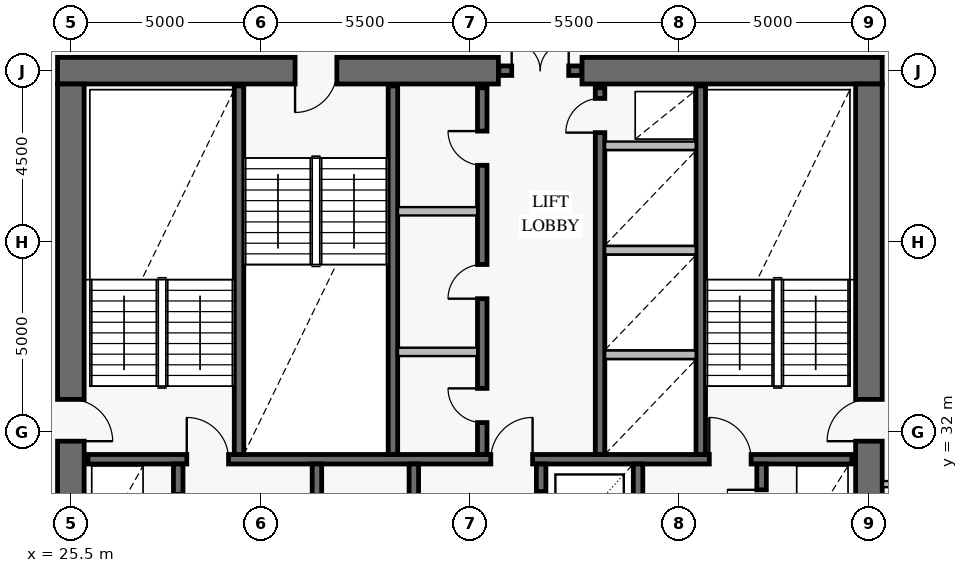
"""IFC4 building model, lengths in metres.
Left out: names, types, materials, properties, quantities, classifications, styles, units other than length and angle.
Written with IfcOpenShell. Run it as: python <this file> out.ifc"""

import sys

from ifc_helpers import new_model, si_unit, direction, frame, frame_2d, origin, place, context, subcontext, project, spatial, rectangle, extrude, element, fill, save


model = new_model("IFC4")
c1 = context("Model", 3, precision=1e-05, world=origin(), true_north=direction((0.0, 1.0)))
c2 = subcontext(c1, "Body", "Model", "MODEL_VIEW")
j1 = project(units=[si_unit("LENGTHUNIT", "METRE"), si_unit("PLANEANGLEUNIT", "RADIAN")], contexts=[c1])
p1 = place(None, origin())
s1 = spatial("IfcSite", under=j1, at=p1, CompositionType="ELEMENT")
p2 = place(p1, origin())
s2 = spatial("IfcBuilding", under=s1, at=p2, CompositionType="ELEMENT")
p3 = place(p2, frame((0.0, 0.0, 196.0)))
s3 = spatial("IfcBuildingStorey", under=s2, at=p3, CompositionType="ELEMENT", Elevation=196.0)
p4 = place(p3, frame((46.85, 41.5, 0.0), z_axis=(0.0, 0.0, 1.0), x_axis=(-1.0, 0.0, 0.0)))
e1 = element("IfcWall", 1, at=p4, inside=s3, PredefinedType="SHEAR", context=c2, shape_type="SweptSolid", body=[
    extrude(rectangle(XDim=7.9, YDim=0.7, at=frame_2d((3.95, 0.0))), origin(), (0.0, 0.0, 1.0), 3.8),
])
p5 = place(p3, frame((36.75, 41.5, 0.0), z_axis=(0.0, 0.0, 1.0), x_axis=(-1.0, 0.0, 0.0)))
e2 = element("IfcWall", 2, at=p5, inside=s3, PredefinedType="SHEAR", context=c2, shape_type="SweptSolid", body=[
    extrude(rectangle(XDim=11.6, YDim=0.7, at=frame_2d((5.8, 0.0))), origin(), (0.0, 0.0, 1.0), 3.8),
])
p6 = place(p5, frame((4.25, 0.0, 0.0)))
e3 = element("IfcOpeningElement", 3, at=p6, cuts=e2, PredefinedType="OPENING", context=c2, shape_type="SweptSolid", body=[
    extrude(rectangle(XDim=1.1, YDim=2.15, at=frame_2d((0.55, 1.075))), frame((0.0, 0.362, 0.0), z_axis=(0.0, -1.0, 0.0), x_axis=(1.0, 0.0, 0.0)), (0.0, 0.0, 1.0), 0.724),
])
p7 = place(p3, frame((25.5, 22.85, 0.0), z_axis=(0.0, 0.0, 1.0), x_axis=(0.0, 1.0, 0.0)))
e4 = element("IfcWall", 4, at=p7, inside=s3, PredefinedType="SHEAR", context=c2, shape_type="SweptSolid", body=[
    extrude(rectangle(XDim=18.3, YDim=0.7, at=frame_2d((9.15, 0.0))), origin(), (0.0, 0.0, 1.0), 3.8),
])
p8 = place(p7, frame((8.9, 0.0, 0.0)))
e5 = element("IfcOpeningElement", 5, at=p8, cuts=e4, PredefinedType="OPENING", context=c2, shape_type="SweptSolid", body=[
    extrude(rectangle(XDim=1.1, YDim=2.15, at=frame_2d((0.55, 1.075))), frame((0.0, 0.362, 0.0), z_axis=(0.0, -1.0, 0.0), x_axis=(1.0, 0.0, 0.0)), (0.0, 0.0, 1.0), 0.724),
])
p9 = place(p3, frame((46.5, 22.85, 0.0), z_axis=(0.0, 0.0, 1.0), x_axis=(0.0, 1.0, 0.0)))
e6 = element("IfcWall", 6, at=p9, inside=s3, PredefinedType="SHEAR", context=c2, shape_type="SweptSolid", body=[
    extrude(rectangle(XDim=18.3, YDim=0.7, at=frame_2d((9.15, 0.0))), origin(), (0.0, 0.0, 1.0), 3.8),
])
p10 = place(p9, frame((8.9, 0.0, 0.0)))
e7 = element("IfcOpeningElement", 7, at=p10, cuts=e6, PredefinedType="OPENING", context=c2, shape_type="SweptSolid", body=[
    extrude(rectangle(XDim=1.1, YDim=2.15, at=frame_2d((0.55, 1.075))), frame((0.0, 0.362, 0.0), z_axis=(0.0, -1.0, 0.0), x_axis=(1.0, 0.0, 0.0)), (0.0, 0.0, 1.0), 0.724),
])
p11 = place(p3, frame((36.76, 41.5, 0.0), z_axis=(0.0, 0.0, 1.0), x_axis=(1.0, 0.0, 0.0)))
e8 = element("IfcWall", 8, at=p11, inside=s3, PredefinedType="SOLIDWALL", context=c2, shape_type="SweptSolid", body=[
    extrude(rectangle(XDim=2.18, YDim=0.25, at=frame_2d((1.09, 0.0))), origin(), (0.0, 0.0, 1.0), 3.8),
])
p12 = place(p11, frame((0.34, 0.0, 0.0)))
e9 = element("IfcOpeningElement", 9, at=p12, cuts=e8, PredefinedType="OPENING", context=c2, shape_type="SweptSolid", body=[
    extrude(rectangle(XDim=1.5, YDim=2.15, at=frame_2d((0.75, 1.075))), frame((0.0, 0.137, 0.0), z_axis=(0.0, -1.0, 0.0), x_axis=(1.0, 0.0, 0.0)), (0.0, 0.0, 1.0), 0.274),
])
p13 = place(p3, frame((25.95, 31.275, 0.0), z_axis=(0.0, 0.0, 1.0), x_axis=(1.0, 0.0, 0.0)))
e10 = element("IfcWall", 10, at=p13, inside=s3, PredefinedType="SOLIDWALL", context=c2, shape_type="SweptSolid", body=[
    extrude(rectangle(XDim=20.1, YDim=0.25, at=frame_2d((10.05, 0.0))), origin(), (0.0, 0.0, 1.0), 3.8),
])
p14 = place(p13, frame((2.6, 0.0, 0.0)))
e11 = element("IfcOpeningElement", 11, at=p14, cuts=e10, PredefinedType="OPENING", context=c2, shape_type="SweptSolid", body=[
    extrude(rectangle(XDim=1.1, YDim=2.15, at=frame_2d((0.55, 1.075))), frame((0.0, 0.137, 0.0), z_axis=(0.0, -1.0, 0.0), x_axis=(1.0, 0.0, 0.0)), (0.0, 0.0, 1.0), 0.274),
])
p15 = place(p13, frame((10.6, 0.0, 0.0)))
e12 = element("IfcOpeningElement", 12, at=p15, cuts=e10, PredefinedType="OPENING", context=c2, shape_type="SweptSolid", body=[
    extrude(rectangle(XDim=1.1, YDim=2.15, at=frame_2d((0.55, 1.075))), frame((0.0, 0.137, 0.0), z_axis=(0.0, -1.0, 0.0), x_axis=(1.0, 0.0, 0.0)), (0.0, 0.0, 1.0), 0.274),
])
p16 = place(p13, frame((16.35, 0.0, 0.0)))
e13 = element("IfcOpeningElement", 13, at=p16, cuts=e10, PredefinedType="OPENING", context=c2, shape_type="SweptSolid", body=[
    extrude(rectangle(XDim=1.1, YDim=2.15, at=frame_2d((0.55, 1.075))), frame((0.0, 0.137, 0.0), z_axis=(0.0, -1.0, 0.0), x_axis=(1.0, 0.0, 0.0)), (0.0, 0.0, 1.0), 0.274),
])
for number, where, z_axis, x_axis in (
    (14, (29.925, 31.4, 0.0), (0.0, 0.0, 1.0), (0.0, 1.0, 0.0)),
    (15, (33.975, 31.4, 0.0), (0.0, 0.0, 1.0), (0.0, 1.0, 0.0)),
    (16, (42.075, 31.4, 0.0), (0.0, 0.0, 1.0), (0.0, 1.0, 0.0)),
):
    element("IfcWall", number, at=place(p3, frame(where, z_axis=z_axis, x_axis=x_axis)), inside=s3, PredefinedType="SOLIDWALL", context=c2, shape_type="SweptSolid", body=[
        extrude(rectangle(XDim=9.7, YDim=0.25, at=frame_2d((4.85, 0.0))), origin(), (0.0, 0.0, 1.0), 3.8),
    ])
p17 = place(p3, frame((36.325, 31.4, 0.0), z_axis=(0.0, 0.0, 1.0), x_axis=(0.0, 1.0, 0.0)))
e17 = element("IfcWall", 17, at=p17, inside=s3, PredefinedType="SOLIDWALL", context=c2, shape_type="SweptSolid", body=[
    extrude(rectangle(XDim=9.65, YDim=0.25, at=frame_2d((4.825, 0.0))), origin(), (0.0, 0.0, 1.0), 3.8),
])
p18 = place(p17, frame((0.84, 0.0, 0.0)))
e18 = element("IfcOpeningElement", 18, at=p18, cuts=e17, PredefinedType="OPENING", context=c2, shape_type="SweptSolid", body=[
    extrude(rectangle(XDim=0.9, YDim=2.1, at=frame_2d((0.45, 1.05))), frame((0.0, 0.137, 0.0), z_axis=(0.0, -1.0, 0.0), x_axis=(1.0, 0.0, 0.0)), (0.0, 0.0, 1.0), 0.274),
])
p19 = place(p17, frame((4.1, 0.0, 0.0)))
e19 = element("IfcOpeningElement", 19, at=p19, cuts=e17, PredefinedType="OPENING", context=c2, shape_type="SweptSolid", body=[
    extrude(rectangle(XDim=0.9, YDim=2.1, at=frame_2d((0.45, 1.05))), frame((0.0, 0.137, 0.0), z_axis=(0.0, -1.0, 0.0), x_axis=(1.0, 0.0, 0.0)), (0.0, 0.0, 1.0), 0.274),
])
p20 = place(p17, frame((7.61, 0.0, 0.0)))
e20 = element("IfcOpeningElement", 20, at=p20, cuts=e17, PredefinedType="OPENING", context=c2, shape_type="SweptSolid", body=[
    extrude(rectangle(XDim=0.9, YDim=2.1, at=frame_2d((0.45, 1.05))), frame((0.0, 0.137, 0.0), z_axis=(0.0, -1.0, 0.0), x_axis=(1.0, 0.0, 0.0)), (0.0, 0.0, 1.0), 0.274),
])
p21 = place(p3, frame((39.425, 31.4, 0.0), z_axis=(0.0, 0.0, 1.0), x_axis=(0.0, 1.0, 0.0)))
e21 = element("IfcWall", 21, at=p21, inside=s3, PredefinedType="SOLIDWALL", context=c2, shape_type="SweptSolid", body=[
    extrude(rectangle(XDim=9.65, YDim=0.25, at=frame_2d((4.825, 0.0))), origin(), (0.0, 0.0, 1.0), 3.8),
])
p22 = place(p21, frame((8.47, 0.0, 0.0)))
e22 = element("IfcOpeningElement", 22, at=p22, cuts=e21, PredefinedType="OPENING", context=c2, shape_type="SweptSolid", body=[
    extrude(rectangle(XDim=0.9, YDim=2.1, at=frame_2d((0.45, 1.05))), frame((0.0, 0.137, 0.0), z_axis=(0.0, -1.0, 0.0), x_axis=(1.0, 0.0, 0.0)), (0.0, 0.0, 1.0), 0.274),
])
p23 = place(p3, frame((28.325, 22.95, 0.0), z_axis=(0.0, 0.0, 1.0), x_axis=(0.0, 1.0, 0.0)))
e23 = element("IfcWall", 23, at=p23, inside=s3, PredefinedType="SOLIDWALL", context=c2, shape_type="SweptSolid", body=[
    extrude(rectangle(XDim=8.2, YDim=0.25, at=frame_2d((4.1, 0.0))), origin(), (0.0, 0.0, 1.0), 3.8),
])
p24 = place(p23, frame((0.75, 0.0, 0.0)))
e24 = element("IfcOpeningElement", 24, at=p24, cuts=e23, PredefinedType="OPENING", context=c2, shape_type="SweptSolid", body=[
    extrude(rectangle(XDim=1.3, YDim=2.3, at=frame_2d((0.65, 1.15))), frame((0.0, 0.137, 0.0), z_axis=(0.0, -1.0, 0.0), x_axis=(1.0, 0.0, 0.0)), (0.0, 0.0, 1.0), 0.274),
])
p25 = place(p23, frame((3.78, 0.0, 0.0)))
e25 = element("IfcOpeningElement", 25, at=p25, cuts=e23, PredefinedType="OPENING", context=c2, shape_type="SweptSolid", body=[
    extrude(rectangle(XDim=0.9, YDim=2.1, at=frame_2d((0.45, 1.05))), frame((0.0, 0.137, 0.0), z_axis=(0.0, -1.0, 0.0), x_axis=(1.0, 0.0, 0.0)), (0.0, 0.0, 1.0), 0.274),
])
p26 = place(p23, frame((6.5, 0.0, 0.0)))
e26 = element("IfcOpeningElement", 26, at=p26, cuts=e23, PredefinedType="OPENING", context=c2, shape_type="SweptSolid", body=[
    extrude(rectangle(XDim=0.9, YDim=2.1, at=frame_2d((0.45, 1.05))), frame((0.0, 0.137, 0.0), z_axis=(0.0, -1.0, 0.0), x_axis=(1.0, 0.0, 0.0)), (0.0, 0.0, 1.0), 0.274),
])
p27 = place(p3, frame((31.975, 22.95, 0.0), z_axis=(0.0, 0.0, 1.0), x_axis=(0.0, 1.0, 0.0)))
e27 = element("IfcWall", 27, at=p27, inside=s3, PredefinedType="SOLIDWALL", context=c2, shape_type="SweptSolid", body=[
    extrude(rectangle(XDim=8.2, YDim=0.25, at=frame_2d((4.1, 0.0))), origin(), (0.0, 0.0, 1.0), 3.8),
])
p28 = place(p3, frame((34.525, 22.95, 0.0), z_axis=(0.0, 0.0, 1.0), x_axis=(0.0, 1.0, 0.0)))
e28 = element("IfcWall", 28, at=p28, inside=s3, PredefinedType="SOLIDWALL", context=c2, shape_type="SweptSolid", body=[
    extrude(rectangle(XDim=8.2, YDim=0.25, at=frame_2d((4.1, 0.0))), origin(), (0.0, 0.0, 1.0), 3.8),
])
p29 = place(p28, frame((2.1, 0.0, 0.0)))
e29 = element("IfcOpeningElement", 29, at=p29, cuts=e28, PredefinedType="OPENING", context=c2, shape_type="SweptSolid", body=[
    extrude(rectangle(XDim=0.9, YDim=2.1, at=frame_2d((0.45, 1.05))), frame((0.0, 0.137, 0.0), z_axis=(0.0, -1.0, 0.0), x_axis=(1.0, 0.0, 0.0)), (0.0, 0.0, 1.0), 0.274),
])
p30 = place(p28, frame((6.3, 0.0, 0.0)))
e30 = element("IfcOpeningElement", 30, at=p30, cuts=e28, PredefinedType="OPENING", context=c2, shape_type="SweptSolid", body=[
    extrude(rectangle(XDim=0.9, YDim=2.1, at=frame_2d((0.45, 1.05))), frame((0.0, 0.137, 0.0), z_axis=(0.0, -1.0, 0.0), x_axis=(1.0, 0.0, 0.0)), (0.0, 0.0, 1.0), 0.274),
])
p31 = place(p3, frame((37.875, 22.95, 0.0), z_axis=(0.0, 0.0, 1.0), x_axis=(0.0, 1.0, 0.0)))
e31 = element("IfcWall", 31, at=p31, inside=s3, PredefinedType="SOLIDWALL", context=c2, shape_type="SweptSolid", body=[
    extrude(rectangle(XDim=8.2, YDim=0.25, at=frame_2d((4.1, 0.0))), origin(), (0.0, 0.0, 1.0), 3.8),
])
p32 = place(p31, frame((0.775, 0.0, 0.0)))
e32 = element("IfcOpeningElement", 32, at=p32, cuts=e31, PredefinedType="OPENING", context=c2, shape_type="SweptSolid", body=[
    extrude(rectangle(XDim=1.1, YDim=2.2, at=frame_2d((0.55, 1.1))), frame((0.0, 0.137, 0.0), z_axis=(0.0, -1.0, 0.0), x_axis=(1.0, 0.0, 0.0)), (0.0, 0.0, 1.0), 0.274),
])
p33 = place(p31, frame((3.575, 0.0, 0.0)))
e33 = element("IfcOpeningElement", 33, at=p33, cuts=e31, PredefinedType="OPENING", context=c2, shape_type="SweptSolid", body=[
    extrude(rectangle(XDim=1.1, YDim=2.2, at=frame_2d((0.55, 1.1))), frame((0.0, 0.137, 0.0), z_axis=(0.0, -1.0, 0.0), x_axis=(1.0, 0.0, 0.0)), (0.0, 0.0, 1.0), 0.274),
])
p34 = place(p31, frame((6.375, 0.0, 0.0)))
e34 = element("IfcOpeningElement", 34, at=p34, cuts=e31, PredefinedType="OPENING", context=c2, shape_type="SweptSolid", body=[
    extrude(rectangle(XDim=1.1, YDim=2.2, at=frame_2d((0.55, 1.1))), frame((0.0, 0.137, 0.0), z_axis=(0.0, -1.0, 0.0), x_axis=(1.0, 0.0, 0.0)), (0.0, 0.0, 1.0), 0.274),
])
p35 = place(p3, frame((40.425, 22.95, 0.0), z_axis=(0.0, 0.0, 1.0), x_axis=(0.0, 1.0, 0.0)))
e35 = element("IfcWall", 35, at=p35, inside=s3, PredefinedType="SOLIDWALL", context=c2, shape_type="SweptSolid", body=[
    extrude(rectangle(XDim=8.2, YDim=0.25, at=frame_2d((4.1, 0.0))), origin(), (0.0, 0.0, 1.0), 3.8),
])
p36 = place(p3, frame((43.675, 22.95, 0.0), z_axis=(0.0, 0.0, 1.0), x_axis=(0.0, 1.0, 0.0)))
e36 = element("IfcWall", 36, at=p36, inside=s3, PredefinedType="SOLIDWALL", context=c2, shape_type="SweptSolid", body=[
    extrude(rectangle(XDim=8.2, YDim=0.25, at=frame_2d((4.1, 0.0))), origin(), (0.0, 0.0, 1.0), 3.8),
])
p37 = place(p36, frame((0.75, 0.0, 0.0)))
e37 = element("IfcOpeningElement", 37, at=p37, cuts=e36, PredefinedType="OPENING", context=c2, shape_type="SweptSolid", body=[
    extrude(rectangle(XDim=1.3, YDim=2.3, at=frame_2d((0.65, 1.15))), frame((0.0, 0.137, 0.0), z_axis=(0.0, -1.0, 0.0), x_axis=(1.0, 0.0, 0.0)), (0.0, 0.0, 1.0), 0.274),
])
p38 = place(p36, frame((3.7, 0.0, 0.0)))
e38 = element("IfcOpeningElement", 38, at=p38, cuts=e36, PredefinedType="OPENING", context=c2, shape_type="SweptSolid", body=[
    extrude(rectangle(XDim=1.3, YDim=2.3, at=frame_2d((0.65, 1.15))), frame((0.0, 0.137, 0.0), z_axis=(0.0, -1.0, 0.0), x_axis=(1.0, 0.0, 0.0)), (0.0, 0.0, 1.0), 0.274),
])
p39 = place(p36, frame((6.62, 0.0, 0.0)))
e39 = element("IfcOpeningElement", 39, at=p39, cuts=e36, PredefinedType="OPENING", context=c2, shape_type="SweptSolid", body=[
    extrude(rectangle(XDim=0.9, YDim=2.1, at=frame_2d((0.45, 1.05))), frame((0.0, 0.137, 0.0), z_axis=(0.0, -1.0, 0.0), x_axis=(1.0, 0.0, 0.0)), (0.0, 0.0, 1.0), 0.274),
])
for number, where, z_axis, x_axis in (
    (40, (34.108, 34.1, 0.0), (0.0, 0.0, 1.0), (1.0, 0.0, 0.0)),
    (41, (34.108, 37.8, 0.0), (0.0, 0.0, 1.0), (1.0, 0.0, 0.0)),
):
    element("IfcWall", number, at=place(p3, frame(where, z_axis=z_axis, x_axis=x_axis)), inside=s3, PredefinedType="PARTITIONING", context=c2, shape_type="SweptSolid", body=[
        extrude(rectangle(XDim=2.084, YDim=0.22, at=frame_2d((1.042, 0.0))), origin(), (0.0, 0.0, 1.0), 3.55),
    ])
for number, where, z_axis, x_axis in (
    (42, (39.558, 34.025, 0.0), (0.0, 0.0, 1.0), (1.0, 0.0, 0.0)),
    (43, (39.558, 36.775, 0.0), (0.0, 0.0, 1.0), (1.0, 0.0, 0.0)),
    (44, (39.558, 39.525, 0.0), (0.0, 0.0, 1.0), (1.0, 0.0, 0.0)),
):
    element("IfcWall", number, at=place(p3, frame(where, z_axis=z_axis, x_axis=x_axis)), inside=s3, PredefinedType="PARTITIONING", context=c2, shape_type="SweptSolid", body=[
        extrude(rectangle(XDim=2.384, YDim=0.22, at=frame_2d((1.192, 0.0))), origin(), (0.0, 0.0, 1.0), 3.55),
    ])
p40 = place(p3, frame((46.87, 30.62, 0.0), z_axis=(0.0, 0.0, 1.0), x_axis=(1.0, 0.0, 0.0)))
e45 = element("IfcWall", 45, at=p40, inside=s3, PredefinedType="PARTITIONING", context=c2, shape_type="SweptSolid", body=[
    extrude(rectangle(XDim=2.03, YDim=0.16, at=frame_2d((1.015, 0.0))), origin(), (0.0, 0.0, 1.0), 3.55),
])
p41 = place(p8, frame((1.1, 0.0, 0.0), z_axis=(0.0, 0.0, 1.0), x_axis=(-1.0, 0.0, 0.0)))
e46 = element("IfcDoor", 46, at=p41, inside=s3, OperationType="SINGLE_SWING_RIGHT", PredefinedType="USERDEFINED", context=c2, shape_type="SweptSolid", body=[
    extrude(rectangle(XDim=1.1, YDim=2.15, at=frame_2d((0.55, 1.075))), frame((0.0, 0.025, 0.0), z_axis=(0.0, -1.0, 0.0), x_axis=(1.0, 0.0, 0.0)), (0.0, 0.0, 1.0), 0.05),
])
fill(e5, e46)
p42 = place(p10, origin())
e47 = element("IfcDoor", 47, at=p42, inside=s3, OperationType="SINGLE_SWING_LEFT", PredefinedType="USERDEFINED", context=c2, shape_type="SweptSolid", body=[
    extrude(rectangle(XDim=1.1, YDim=2.15, at=frame_2d((0.55, 1.075))), frame((0.0, 0.025, 0.0), z_axis=(0.0, -1.0, 0.0), x_axis=(1.0, 0.0, 0.0)), (0.0, 0.0, 1.0), 0.05),
])
fill(e7, e47)
p43 = place(p6, origin())
e48 = element("IfcDoor", 48, at=p43, inside=s3, OperationType="SINGLE_SWING_RIGHT", PredefinedType="USERDEFINED", context=c2, shape_type="SweptSolid", body=[
    extrude(rectangle(XDim=1.1, YDim=2.15, at=frame_2d((0.55, 1.075))), frame((0.0, 0.025, 0.0), z_axis=(0.0, -1.0, 0.0), x_axis=(1.0, 0.0, 0.0)), (0.0, 0.0, 1.0), 0.05),
])
fill(e3, e48)
p44 = place(p12, origin())
e49 = element("IfcDoor", 49, at=p44, inside=s3, OperationType="DOUBLE_DOOR_SINGLE_SWING", PredefinedType="DOOR", context=c2, shape_type="SweptSolid", body=[
    extrude(rectangle(XDim=1.5, YDim=2.15, at=frame_2d((0.75, 1.075))), frame((0.0, 0.025, 0.0), z_axis=(0.0, -1.0, 0.0), x_axis=(1.0, 0.0, 0.0)), (0.0, 0.0, 1.0), 0.05),
])
fill(e9, e49)
p45 = place(p14, origin())
e50 = element("IfcDoor", 50, at=p45, inside=s3, OperationType="SINGLE_SWING_LEFT", PredefinedType="USERDEFINED", context=c2, shape_type="SweptSolid", body=[
    extrude(rectangle(XDim=1.1, YDim=2.15, at=frame_2d((0.55, 1.075))), frame((0.0, 0.025, 0.0), z_axis=(0.0, -1.0, 0.0), x_axis=(1.0, 0.0, 0.0)), (0.0, 0.0, 1.0), 0.05),
])
fill(e11, e50)
p46 = place(p15, origin())
e51 = element("IfcDoor", 51, at=p46, inside=s3, OperationType="SINGLE_SWING_RIGHT", PredefinedType="USERDEFINED", context=c2, shape_type="SweptSolid", body=[
    extrude(rectangle(XDim=1.1, YDim=2.15, at=frame_2d((0.55, 1.075))), frame((0.0, 0.025, 0.0), z_axis=(0.0, -1.0, 0.0), x_axis=(1.0, 0.0, 0.0)), (0.0, 0.0, 1.0), 0.05),
])
fill(e12, e51)
p47 = place(p16, origin())
e52 = element("IfcDoor", 52, at=p47, inside=s3, OperationType="SINGLE_SWING_LEFT", PredefinedType="USERDEFINED", context=c2, shape_type="SweptSolid", body=[
    extrude(rectangle(XDim=1.1, YDim=2.15, at=frame_2d((0.55, 1.075))), frame((0.0, 0.025, 0.0), z_axis=(0.0, -1.0, 0.0), x_axis=(1.0, 0.0, 0.0)), (0.0, 0.0, 1.0), 0.05),
])
fill(e13, e52)
p48 = place(p18, origin())
e53 = element("IfcDoor", 53, at=p48, inside=s3, OperationType="SINGLE_SWING_RIGHT", PredefinedType="DOOR", context=c2, shape_type="SweptSolid", body=[
    extrude(rectangle(XDim=0.9, YDim=2.1, at=frame_2d((0.45, 1.05))), frame((0.0, 0.025, 0.0), z_axis=(0.0, -1.0, 0.0), x_axis=(1.0, 0.0, 0.0)), (0.0, 0.0, 1.0), 0.05),
])
fill(e18, e53)
p49 = place(p19, origin())
e54 = element("IfcDoor", 54, at=p49, inside=s3, OperationType="SINGLE_SWING_LEFT", PredefinedType="DOOR", context=c2, shape_type="SweptSolid", body=[
    extrude(rectangle(XDim=0.9, YDim=2.1, at=frame_2d((0.45, 1.05))), frame((0.0, 0.025, 0.0), z_axis=(0.0, -1.0, 0.0), x_axis=(1.0, 0.0, 0.0)), (0.0, 0.0, 1.0), 0.05),
])
fill(e19, e54)
p50 = place(p20, origin())
e55 = element("IfcDoor", 55, at=p50, inside=s3, OperationType="SINGLE_SWING_RIGHT", PredefinedType="DOOR", context=c2, shape_type="SweptSolid", body=[
    extrude(rectangle(XDim=0.9, YDim=2.1, at=frame_2d((0.45, 1.05))), frame((0.0, 0.025, 0.0), z_axis=(0.0, -1.0, 0.0), x_axis=(1.0, 0.0, 0.0)), (0.0, 0.0, 1.0), 0.05),
])
fill(e20, e55)
p51 = place(p22, origin())
e56 = element("IfcDoor", 56, at=p51, inside=s3, OperationType="SINGLE_SWING_LEFT", PredefinedType="DOOR", context=c2, shape_type="SweptSolid", body=[
    extrude(rectangle(XDim=0.9, YDim=2.1, at=frame_2d((0.45, 1.05))), frame((0.0, 0.025, 0.0), z_axis=(0.0, -1.0, 0.0), x_axis=(1.0, 0.0, 0.0)), (0.0, 0.0, 1.0), 0.05),
])
fill(e22, e56)
p52 = place(p34, origin())
e57 = element("IfcDoor", 57, at=p52, inside=s3, OperationType="DOUBLE_DOOR_SLIDING", PredefinedType="DOOR", context=c2, shape_type="SweptSolid", body=[
    extrude(rectangle(XDim=1.1, YDim=2.2, at=frame_2d((0.55, 1.1))), frame((0.0, 0.025, 0.0), z_axis=(0.0, -1.0, 0.0), x_axis=(1.0, 0.0, 0.0)), (0.0, 0.0, 1.0), 0.05),
])
fill(e34, e57)
p53 = place(p39, origin())
e58 = element("IfcDoor", 58, at=p53, inside=s3, OperationType="SINGLE_SWING_RIGHT", PredefinedType="DOOR", context=c2, shape_type="SweptSolid", body=[
    extrude(rectangle(XDim=0.9, YDim=2.1, at=frame_2d((0.45, 1.05))), frame((0.0, 0.025, 0.0), z_axis=(0.0, -1.0, 0.0), x_axis=(1.0, 0.0, 0.0)), (0.0, 0.0, 1.0), 0.05),
])
fill(e39, e58)
save(model, sys.argv[1])
